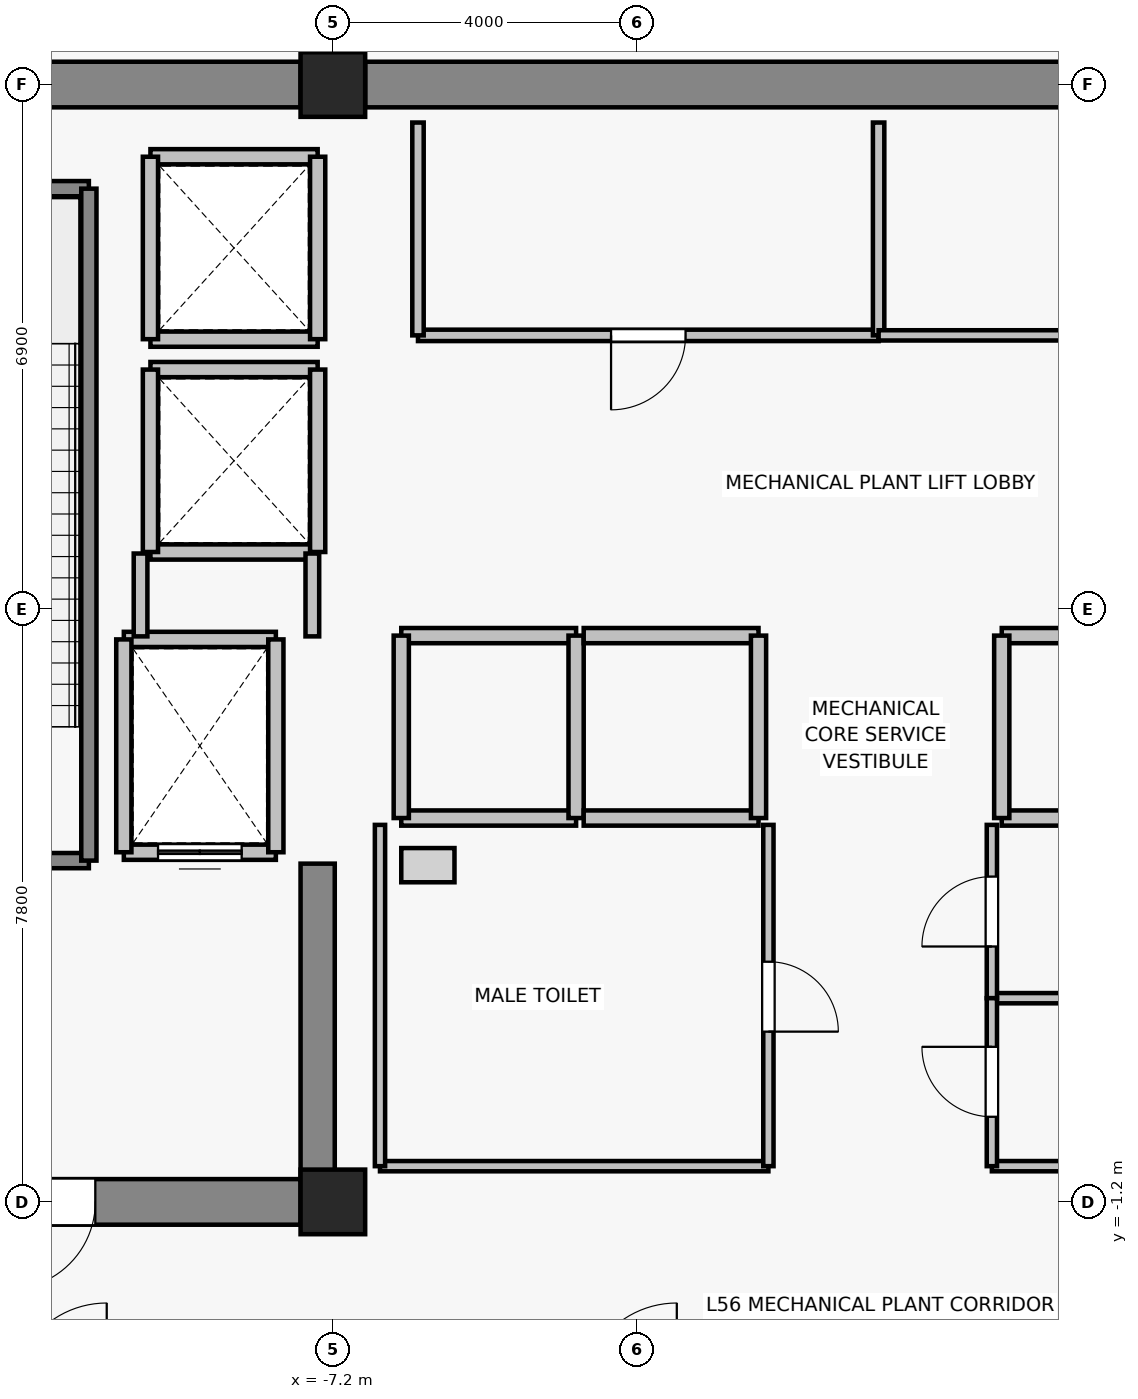
"""IFC4 building model, lengths in metres.
Left out: names, types, materials, properties, quantities, classifications, styles, units other than length and angle.
Written with IfcOpenShell. Run it as: python <this file> out.ifc"""

import sys

from ifc_helpers import new_model, si_unit, direction, frame, frame_2d, origin, origin_2d, place, context, subcontext, project, spatial, rectangle, extrude, source, transform, mapped, element, fill, save


model = new_model("IFC4")
c1 = context("Model", 3, precision=1e-05, world=origin(), true_north=direction((0.0, 1.0)))
c2 = subcontext(c1, "Body", "Model", "MODEL_VIEW")
j1 = project(units=[si_unit("LENGTHUNIT", "METRE"), si_unit("PLANEANGLEUNIT", "RADIAN")], contexts=[c1])
p1 = place(None, origin())
s1 = spatial("IfcSite", under=j1, at=p1, CompositionType="ELEMENT")
p2 = place(p1, origin())
s2 = spatial("IfcBuilding", under=s1, at=p2, CompositionType="ELEMENT")
p3 = place(p2, frame((0.0, 0.0, 199.0)))
s3 = spatial("IfcBuildingStorey", under=s2, at=p3, CompositionType="ELEMENT", Elevation=199.0)
for number, where, z_axis, x_axis in (
    (1, (-7.2, -1.2, 0.0), (0.0, 0.0, 1.0), (1.0, 0.0, 0.0)),
    (2, (-7.2, 13.5, 0.0), (0.0, 0.0, 1.0), (1.0, 0.0, 0.0)),
):
    element("IfcColumn", number, at=place(p3, frame(where, z_axis=z_axis, x_axis=x_axis)), inside=s3, PredefinedType="COLUMN", context=c2, shape_type="SweptSolid", body=[
        extrude(rectangle(XDim=0.85, YDim=0.85, at=origin_2d()), origin(), (0.0, 0.0, 1.0), 6.6),
    ])
p4 = place(p3, frame((-13.975, 13.5, 0.0), z_axis=(0.0, 0.0, 1.0), x_axis=(1.0, 0.0, 0.0)))
e3 = element("IfcWall", 3, at=p4, inside=s3, PredefinedType="SHEAR", context=c2, shape_type="SweptSolid", body=[
    extrude(rectangle(XDim=6.35, YDim=0.6, at=frame_2d((3.175, 0.0))), origin(), (0.0, 0.0, 1.0), 6.35),
])
p5 = place(p3, frame((-6.775, 13.5, 0.0), z_axis=(0.0, 0.0, 1.0), x_axis=(1.0, 0.0, 0.0)))
e4 = element("IfcWall", 4, at=p5, inside=s3, PredefinedType="SHEAR", context=c2, shape_type="SweptSolid", body=[
    extrude(rectangle(XDim=13.55, YDim=0.6, at=frame_2d((6.775, 0.0))), origin(), (0.0, 0.0, 1.0), 6.35),
])
p6 = place(p3, frame((-7.625, -1.2, 0.0), z_axis=(0.0, 0.0, 1.0), x_axis=(-1.0, 0.0, 0.0)))
e5 = element("IfcWall", 5, at=p6, inside=s3, PredefinedType="SHEAR", context=c2, shape_type="SweptSolid", body=[
    extrude(rectangle(XDim=6.35, YDim=0.6, at=frame_2d((3.175, 0.0))), origin(), (0.0, 0.0, 1.0), 6.35),
])
p7 = place(p6, frame((2.7, 0.0, 0.0)))
e6 = element("IfcOpeningElement", 6, at=p7, cuts=e5, PredefinedType="OPENING", context=c2, shape_type="SweptSolid", body=[
    extrude(rectangle(XDim=1.15, YDim=2.15, at=frame_2d((0.575, 1.075))), frame((0.0, 0.31, 0.0), z_axis=(0.0, -1.0, 0.0), x_axis=(1.0, 0.0, 0.0)), (0.0, 0.0, 1.0), 0.62),
])
p8 = place(p3, frame((-7.4, -0.9, 0.0), z_axis=(0.0, 0.0, 1.0), x_axis=(0.0, 1.0, 0.0)))
e7 = element("IfcWall", 7, at=p8, inside=s3, PredefinedType="SHEAR", context=c2, shape_type="SweptSolid", body=[
    extrude(rectangle(XDim=4.15, YDim=0.45, at=frame_2d((2.075, 0.0))), origin(), (0.0, 0.0, 1.0), 6.35),
])
p9 = place(p3, frame((-7.95, 3.4, 0.0), z_axis=(0.0, 0.0, 1.0), x_axis=(-1.0, 0.0, 0.0)))
e8 = element("IfcWall", 8, at=p9, inside=s3, PredefinedType="SOLIDWALL", context=c2, shape_type="SweptSolid", body=[
    extrude(rectangle(XDim=2.0, YDim=0.2, at=frame_2d((1.0, 0.0))), origin(), (0.0, 0.0, 1.0), 6.35),
])
p10 = place(p9, frame((0.45, 0.0, 0.0)))
e9 = element("IfcOpeningElement", 9, at=p10, cuts=e8, PredefinedType="OPENING", context=c2, shape_type="SweptSolid", body=[
    extrude(rectangle(XDim=1.1, YDim=2.2, at=frame_2d((0.55, 1.1))), frame((0.0, 0.11, 0.0), z_axis=(0.0, -1.0, 0.0), x_axis=(1.0, 0.0, 0.0)), (0.0, 0.0, 1.0), 0.22),
])
p11 = place(p3, frame((-9.95, 6.2, 0.0), z_axis=(0.0, 0.0, 1.0), x_axis=(1.0, 0.0, 0.0)))
e10 = element("IfcWall", 10, at=p11, inside=s3, PredefinedType="SOLIDWALL", context=c2, shape_type="SweptSolid", body=[
    extrude(rectangle(XDim=2.0, YDim=0.2, at=frame_2d((1.0, 0.0))), origin(), (0.0, 0.0, 1.0), 6.35),
])
for number, where, z_axis, x_axis in (
    (11, (-9.95, 3.4, 0.0), (0.0, 0.0, 1.0), (0.0, 1.0, 0.0)),
    (12, (-7.95, 6.2, 0.0), (0.0, 0.0, 1.0), (0.0, -1.0, 0.0)),
):
    element("IfcWall", number, at=place(p3, frame(where, z_axis=z_axis, x_axis=x_axis)), inside=s3, PredefinedType="SOLIDWALL", context=c2, shape_type="SweptSolid", body=[
        extrude(rectangle(XDim=2.8, YDim=0.2, at=frame_2d((1.4, 0.0))), origin(), (0.0, 0.0, 1.0), 6.35),
    ])
for number, where, z_axis, x_axis in (
    (13, (-4.0, 3.85, 0.0), (0.0, 0.0, 1.0), (-1.0, 0.0, 0.0)),
    (14, (-6.3, 6.25, 0.0), (0.0, 0.0, 1.0), (1.0, 0.0, 0.0)),
):
    element("IfcWall", number, at=place(p3, frame(where, z_axis=z_axis, x_axis=x_axis)), inside=s3, PredefinedType="SOLIDWALL", context=c2, shape_type="SweptSolid", body=[
        extrude(rectangle(XDim=2.3, YDim=0.2, at=frame_2d((1.15, 0.0))), origin(), (0.0, 0.0, 1.0), 6.35),
    ])
for number, where, z_axis, x_axis in (
    (15, (-6.3, 3.85, 0.0), (0.0, 0.0, 1.0), (0.0, 1.0, 0.0)),
    (16, (-4.0, 6.25, 0.0), (0.0, 0.0, 1.0), (0.0, -1.0, 0.0)),
):
    element("IfcWall", number, at=place(p3, frame(where, z_axis=z_axis, x_axis=x_axis)), inside=s3, PredefinedType="SOLIDWALL", context=c2, shape_type="SweptSolid", body=[
        extrude(rectangle(XDim=2.4, YDim=0.2, at=frame_2d((1.2, 0.0))), origin(), (0.0, 0.0, 1.0), 6.35),
    ])
for number, where, z_axis, x_axis in (
    (17, (-1.6, 3.85, 0.0), (0.0, 0.0, 1.0), (-1.0, 0.0, 0.0)),
    (18, (-3.9, 6.25, 0.0), (0.0, 0.0, 1.0), (1.0, 0.0, 0.0)),
):
    element("IfcWall", number, at=place(p3, frame(where, z_axis=z_axis, x_axis=x_axis)), inside=s3, PredefinedType="SOLIDWALL", context=c2, shape_type="SweptSolid", body=[
        extrude(rectangle(XDim=2.3, YDim=0.2, at=frame_2d((1.15, 0.0))), origin(), (0.0, 0.0, 1.0), 6.35),
    ])
p12 = place(p3, frame((-1.6, 6.25, 0.0), z_axis=(0.0, 0.0, 1.0), x_axis=(0.0, -1.0, 0.0)))
e19 = element("IfcWall", 19, at=p12, inside=s3, PredefinedType="SOLIDWALL", context=c2, shape_type="SweptSolid", body=[
    extrude(rectangle(XDim=2.4, YDim=0.2, at=frame_2d((1.2, 0.0))), origin(), (0.0, 0.0, 1.0), 6.35),
])
for number, where, z_axis, x_axis in (
    (20, (3.9, 3.85, 0.0), (0.0, 0.0, 1.0), (-1.0, 0.0, 0.0)),
    (21, (1.6, 6.25, 0.0), (0.0, 0.0, 1.0), (1.0, 0.0, 0.0)),
):
    element("IfcWall", number, at=place(p3, frame(where, z_axis=z_axis, x_axis=x_axis)), inside=s3, PredefinedType="SOLIDWALL", context=c2, shape_type="SweptSolid", body=[
        extrude(rectangle(XDim=2.3, YDim=0.2, at=frame_2d((1.15, 0.0))), origin(), (0.0, 0.0, 1.0), 6.35),
    ])
p13 = place(p3, frame((1.6, 3.85, 0.0), z_axis=(0.0, 0.0, 1.0), x_axis=(0.0, 1.0, 0.0)))
e22 = element("IfcWall", 22, at=p13, inside=s3, PredefinedType="SOLIDWALL", context=c2, shape_type="SweptSolid", body=[
    extrude(rectangle(XDim=2.4, YDim=0.2, at=frame_2d((1.2, 0.0))), origin(), (0.0, 0.0, 1.0), 6.35),
])
for number, where, z_axis, x_axis in (
    (23, (-7.4, 7.35, 0.0), (0.0, 0.0, 1.0), (-1.0, 0.0, 0.0)),
    (24, (-9.6, 9.75, 0.0), (0.0, 0.0, 1.0), (1.0, 0.0, 0.0)),
):
    element("IfcWall", number, at=place(p3, frame(where, z_axis=z_axis, x_axis=x_axis)), inside=s3, PredefinedType="SOLIDWALL", context=c2, shape_type="SweptSolid", body=[
        extrude(rectangle(XDim=2.2, YDim=0.2, at=frame_2d((1.1, 0.0))), origin(), (0.0, 0.0, 1.0), 5.89),
    ])
p14 = place(p3, frame((-9.6, 7.35, 0.0), z_axis=(0.0, 0.0, 1.0), x_axis=(0.0, 1.0, 0.0)))
e25 = element("IfcWall", 25, at=p14, inside=s3, PredefinedType="SOLIDWALL", context=c2, shape_type="SweptSolid", body=[
    extrude(rectangle(XDim=2.4, YDim=0.2, at=frame_2d((1.2, 0.0))), origin(), (0.0, 0.0, 1.0), 6.35),
])
p15 = place(p3, frame((-7.4, 9.75, 0.0), z_axis=(0.0, 0.0, 1.0), x_axis=(0.0, -1.0, 0.0)))
e26 = element("IfcWall", 26, at=p15, inside=s3, PredefinedType="SOLIDWALL", context=c2, shape_type="SweptSolid", body=[
    extrude(rectangle(XDim=2.4, YDim=0.2, at=frame_2d((1.2, 0.0))), origin(), (0.0, 0.0, 1.0), 5.89),
])
for number, where, z_axis, x_axis in (
    (27, (-7.4, 10.15, 0.0), (0.0, 0.0, 1.0), (-1.0, 0.0, 0.0)),
    (28, (-9.6, 12.55, 0.0), (0.0, 0.0, 1.0), (1.0, 0.0, 0.0)),
):
    element("IfcWall", number, at=place(p3, frame(where, z_axis=z_axis, x_axis=x_axis)), inside=s3, PredefinedType="SOLIDWALL", context=c2, shape_type="SweptSolid", body=[
        extrude(rectangle(XDim=2.2, YDim=0.2, at=frame_2d((1.1, 0.0))), origin(), (0.0, 0.0, 1.0), 5.89),
    ])
p16 = place(p3, frame((-9.6, 10.15, 0.0), z_axis=(0.0, 0.0, 1.0), x_axis=(0.0, 1.0, 0.0)))
e29 = element("IfcWall", 29, at=p16, inside=s3, PredefinedType="SOLIDWALL", context=c2, shape_type="SweptSolid", body=[
    extrude(rectangle(XDim=2.4, YDim=0.2, at=frame_2d((1.2, 0.0))), origin(), (0.0, 0.0, 1.0), 6.35),
])
p17 = place(p3, frame((-7.4, 12.55, 0.0), z_axis=(0.0, 0.0, 1.0), x_axis=(0.0, -1.0, 0.0)))
e30 = element("IfcWall", 30, at=p17, inside=s3, PredefinedType="SOLIDWALL", context=c2, shape_type="SweptSolid", body=[
    extrude(rectangle(XDim=2.4, YDim=0.2, at=frame_2d((1.2, 0.0))), origin(), (0.0, 0.0, 1.0), 5.89),
])
p18 = place(p3, frame((-10.41, 3.29, 0.0), z_axis=(0.0, 0.0, 1.0), x_axis=(-1.0, 0.0, 0.0)))
e31 = element("IfcWall", 31, at=p18, inside=s3, PredefinedType="SOLIDWALL", context=c2, shape_type="SweptSolid", body=[
    extrude(rectangle(XDim=3.52, YDim=0.2, at=frame_2d((1.76, 0.0))), origin(), (0.0, 0.0, 1.0), 6.35),
])
p19 = place(p18, frame((1.165, 0.0, 0.0)))
e32 = element("IfcOpeningElement", 32, at=p19, cuts=e31, PredefinedType="OPENING", context=c2, shape_type="SweptSolid", body=[
    extrude(rectangle(XDim=1.15, YDim=2.15, at=frame_2d((0.575, 1.075))), frame((0.0, 0.11, 0.0), z_axis=(0.0, -1.0, 0.0), x_axis=(1.0, 0.0, 0.0)), (0.0, 0.0, 1.0), 0.22),
])
p20 = place(p3, frame((-13.93, 12.13, 0.0), z_axis=(0.0, 0.0, 1.0), x_axis=(1.0, 0.0, 0.0)))
e33 = element("IfcWall", 33, at=p20, inside=s3, PredefinedType="SOLIDWALL", context=c2, shape_type="SweptSolid", body=[
    extrude(rectangle(XDim=3.52, YDim=0.2, at=frame_2d((1.76, 0.0))), origin(), (0.0, 0.0, 1.0), 6.35),
])
p21 = place(p3, frame((-10.41, 12.13, 0.0), z_axis=(0.0, 0.0, 1.0), x_axis=(0.0, -1.0, 0.0)))
e34 = element("IfcWall", 34, at=p21, inside=s3, PredefinedType="SOLIDWALL", context=c2, shape_type="SweptSolid", body=[
    extrude(rectangle(XDim=8.84, YDim=0.2, at=frame_2d((4.42, 0.0))), origin(), (0.0, 0.0, 1.0), 6.35),
])
p22 = place(p3, frame((-9.73, 6.24, 0.0), z_axis=(0.0, 0.0, 1.0), x_axis=(0.0, 1.0, 0.0)))
e35 = element("IfcWall", 35, at=p22, inside=s3, PredefinedType="PARTITIONING", context=c2, shape_type="SweptSolid", body=[
    extrude(rectangle(XDim=1.09, YDim=0.18, at=frame_2d((0.545, 0.0))), origin(), (0.0, 0.0, 1.0), 6.35),
])
p23 = place(p3, frame((-7.47, 7.33, 0.0), z_axis=(0.0, 0.0, 1.0), x_axis=(0.0, -1.0, 0.0)))
e36 = element("IfcWall", 36, at=p23, inside=s3, PredefinedType="PARTITIONING", context=c2, shape_type="SweptSolid", body=[
    extrude(rectangle(XDim=1.09, YDim=0.18, at=frame_2d((0.545, 0.0))), origin(), (0.0, 0.0, 1.0), 5.89),
])
p24 = place(p3, frame((-0.02, 10.2, 0.0), z_axis=(0.0, 0.0, 1.0), x_axis=(-1.0, 0.0, 0.0)))
e37 = element("IfcWall", 37, at=p24, inside=s3, PredefinedType="PARTITIONING", context=c2, shape_type="SweptSolid", body=[
    extrude(rectangle(XDim=6.06, YDim=0.15, at=frame_2d((3.03, 0.0))), origin(), (0.0, 0.0, 1.0), 5.89),
])
p25 = place(p24, frame((2.54, 0.0, 0.0)))
e38 = element("IfcOpeningElement", 38, at=p25, cuts=e37, PredefinedType="OPENING", context=c2, shape_type="SweptSolid", body=[
    extrude(rectangle(XDim=0.98, YDim=2.15, at=frame_2d((0.49, 1.075))), frame((0.0, 0.085, 0.0), z_axis=(0.0, -1.0, 0.0), x_axis=(1.0, 0.0, 0.0)), (0.0, 0.0, 1.0), 0.17),
])
p26 = place(p3, frame((-6.08, 10.2, 0.0), z_axis=(0.0, 0.0, 1.0), x_axis=(0.0, 1.0, 0.0)))
e39 = element("IfcWall", 39, at=p26, inside=s3, PredefinedType="PARTITIONING", context=c2, shape_type="SweptSolid", body=[
    extrude(rectangle(XDim=2.8, YDim=0.15, at=frame_2d((1.4, 0.0))), origin(), (0.0, 0.0, 1.0), 6.35),
])
p27 = place(p3, frame((-0.02, 13.0, 0.0), z_axis=(0.0, 0.0, 1.0), x_axis=(0.0, -1.0, 0.0)))
e40 = element("IfcWall", 40, at=p27, inside=s3, PredefinedType="PARTITIONING", context=c2, shape_type="SweptSolid", body=[
    extrude(rectangle(XDim=2.8, YDim=0.15, at=frame_2d((1.4, 0.0))), origin(), (0.0, 0.0, 1.0), 5.89),
])
p28 = place(p3, frame((6.08, 10.2, 0.0), z_axis=(0.0, 0.0, 1.0), x_axis=(-1.0, 0.0, 0.0)))
e41 = element("IfcWall", 41, at=p28, inside=s3, PredefinedType="PARTITIONING", context=c2, shape_type="SweptSolid", body=[
    extrude(rectangle(XDim=6.1, YDim=0.135, at=frame_2d((3.05, 0.0))), origin(), (0.0, 0.0, 1.0), 5.89),
])
p29 = place(p28, frame((2.56, 0.0, 0.0)))
e42 = element("IfcOpeningElement", 42, at=p29, cuts=e41, PredefinedType="OPENING", context=c2, shape_type="SweptSolid", body=[
    extrude(rectangle(XDim=0.98, YDim=2.15, at=frame_2d((0.49, 1.075))), frame((0.0, 0.077, 0.0), z_axis=(0.0, -1.0, 0.0), x_axis=(1.0, 0.0, 0.0)), (0.0, 0.0, 1.0), 0.155),
])
p30 = place(p3, frame((-1.47, -0.73, 0.0), z_axis=(0.0, 0.0, 1.0), x_axis=(-1.0, 0.0, 0.0)))
e43 = element("IfcWall", 43, at=p30, inside=s3, PredefinedType="PARTITIONING", context=c2, shape_type="SweptSolid", body=[
    extrude(rectangle(XDim=5.11, YDim=0.135, at=frame_2d((2.555, 0.0))), origin(), (0.0, 0.0, 1.0), 6.35),
])
p31 = place(p3, frame((-6.58, -0.73, 0.0), z_axis=(0.0, 0.0, 1.0), x_axis=(0.0, 1.0, 0.0)))
e44 = element("IfcWall", 44, at=p31, inside=s3, PredefinedType="PARTITIONING", context=c2, shape_type="SweptSolid", body=[
    extrude(rectangle(XDim=4.49, YDim=0.135, at=frame_2d((2.245, 0.0))), origin(), (0.0, 0.0, 1.0), 6.35),
])
p32 = place(p3, frame((-1.47, 3.76, 0.0), z_axis=(0.0, 0.0, 1.0), x_axis=(0.0, -1.0, 0.0)))
e45 = element("IfcWall", 45, at=p32, inside=s3, PredefinedType="PARTITIONING", context=c2, shape_type="SweptSolid", body=[
    extrude(rectangle(XDim=4.49, YDim=0.135, at=frame_2d((2.245, 0.0))), origin(), (0.0, 0.0, 1.0), 6.35),
])
p33 = place(p32, frame((1.8, 0.0, 0.0)))
e46 = element("IfcOpeningElement", 46, at=p33, cuts=e45, PredefinedType="OPENING", context=c2, shape_type="SweptSolid", body=[
    extrude(rectangle(XDim=0.92, YDim=2.1, at=frame_2d((0.46, 1.05))), frame((0.0, 0.077, 0.0), z_axis=(0.0, -1.0, 0.0), x_axis=(1.0, 0.0, 0.0)), (0.0, 0.0, 1.0), 0.155),
])
p34 = place(p3, frame((6.58, 1.48, 0.0), z_axis=(0.0, 0.0, 1.0), x_axis=(-1.0, 0.0, 0.0)))
e47 = element("IfcWall", 47, at=p34, inside=s3, PredefinedType="PARTITIONING", context=c2, shape_type="SweptSolid", body=[
    extrude(rectangle(XDim=5.11, YDim=0.135, at=frame_2d((2.555, 0.0))), origin(), (0.0, 0.0, 1.0), 6.35),
])
p35 = place(p3, frame((1.47, 1.48, 0.0), z_axis=(0.0, 0.0, 1.0), x_axis=(0.0, 1.0, 0.0)))
e48 = element("IfcWall", 48, at=p35, inside=s3, PredefinedType="PARTITIONING", context=c2, shape_type="SweptSolid", body=[
    extrude(rectangle(XDim=2.28, YDim=0.135, at=frame_2d((1.14, 0.0))), origin(), (0.0, 0.0, 1.0), 6.35),
])
p36 = place(p35, frame((0.68, 0.0, 0.0)))
e49 = element("IfcOpeningElement", 49, at=p36, cuts=e48, PredefinedType="OPENING", context=c2, shape_type="SweptSolid", body=[
    extrude(rectangle(XDim=0.92, YDim=2.1, at=frame_2d((0.46, 1.05))), frame((0.0, 0.077, 0.0), z_axis=(0.0, -1.0, 0.0), x_axis=(1.0, 0.0, 0.0)), (0.0, 0.0, 1.0), 0.155),
])
p37 = place(p3, frame((4.18, -0.73, 0.0), z_axis=(0.0, 0.0, 1.0), x_axis=(-1.0, 0.0, 0.0)))
e50 = element("IfcWall", 50, at=p37, inside=s3, PredefinedType="PARTITIONING", context=c2, shape_type="SweptSolid", body=[
    extrude(rectangle(XDim=2.71, YDim=0.135, at=frame_2d((1.355, 0.0))), origin(), (0.0, 0.0, 1.0), 6.35),
])
p38 = place(p3, frame((1.47, -0.73, 0.0), z_axis=(0.0, 0.0, 1.0), x_axis=(0.0, 1.0, 0.0)))
e51 = element("IfcWall", 51, at=p38, inside=s3, PredefinedType="PARTITIONING", context=c2, shape_type="SweptSolid", body=[
    extrude(rectangle(XDim=2.21, YDim=0.135, at=frame_2d((1.105, 0.0))), origin(), (0.0, 0.0, 1.0), 6.35),
])
p39 = place(p38, frame((0.65, 0.0, 0.0)))
e52 = element("IfcOpeningElement", 52, at=p39, cuts=e51, PredefinedType="OPENING", context=c2, shape_type="SweptSolid", body=[
    extrude(rectangle(XDim=0.92, YDim=2.1, at=frame_2d((0.46, 1.05))), frame((0.0, 0.077, 0.0), z_axis=(0.0, -1.0, 0.0), x_axis=(1.0, 0.0, 0.0)), (0.0, 0.0, 1.0), 0.155),
])
m1 = source(origin(), c2, "Body", "SweptSolid", [
    extrude(rectangle(XDim=1.1, YDim=2.2, at=frame_2d((0.55, 1.1))), frame((0.0, 0.025, 0.0), z_axis=(0.0, -1.0, 0.0), x_axis=(1.0, 0.0, 0.0)), (0.0, 0.0, 1.0), 0.05),
])
p40 = place(p10, origin())
e53 = element("IfcDoor", 53, at=p40, inside=s3, OperationType="DOUBLE_DOOR_SLIDING", PredefinedType="DOOR", context=c2, shape_type="MappedRepresentation", body=[
    mapped(m1, transform((0.0, 0.0, 0.0), x_axis=(1.0, 0.0, 0.0), y_axis=(0.0, 1.0, 0.0), z_axis=(0.0, 0.0, 1.0), scale=1.0)),
])
fill(e9, e53)
m2 = source(origin(), c2, "Body", "SweptSolid", [
    extrude(rectangle(XDim=1.15, YDim=2.15, at=frame_2d((0.575, 1.075))), frame((0.0, 0.025, 0.0), z_axis=(0.0, -1.0, 0.0), x_axis=(1.0, 0.0, 0.0)), (0.0, 0.0, 1.0), 0.05),
])
p41 = place(p7, origin())
e54 = element("IfcDoor", 54, at=p41, inside=s3, OperationType="SINGLE_SWING_RIGHT", PredefinedType="DOOR", context=c2, shape_type="MappedRepresentation", body=[
    mapped(m2, transform((0.0, 0.0, 0.0), x_axis=(1.0, 0.0, 0.0), y_axis=(0.0, 1.0, 0.0), z_axis=(0.0, 0.0, 1.0), scale=1.0)),
])
fill(e6, e54)
m3 = source(origin(), c2, "Body", "SweptSolid", [
    extrude(rectangle(XDim=0.98, YDim=2.15, at=frame_2d((0.49, 1.075))), frame((0.0, 0.025, 0.0), z_axis=(0.0, -1.0, 0.0), x_axis=(1.0, 0.0, 0.0)), (0.0, 0.0, 1.0), 0.05),
])
p42 = place(p25, origin())
e55 = element("IfcDoor", 55, at=p42, inside=s3, OperationType="SINGLE_SWING_RIGHT", PredefinedType="DOOR", context=c2, shape_type="MappedRepresentation", body=[
    mapped(m3, transform((0.0, 0.0, 0.0), x_axis=(1.0, 0.0, 0.0), y_axis=(0.0, 1.0, 0.0), z_axis=(0.0, 0.0, 1.0), scale=1.0)),
])
fill(e38, e55)
m4 = source(origin(), c2, "Body", "SweptSolid", [
    extrude(rectangle(XDim=0.92, YDim=2.1, at=frame_2d((0.46, 1.05))), frame((0.0, 0.025, 0.0), z_axis=(0.0, -1.0, 0.0), x_axis=(1.0, 0.0, 0.0)), (0.0, 0.0, 1.0), 0.05),
])
p43 = place(p33, origin())
e56 = element("IfcDoor", 56, at=p43, inside=s3, OperationType="SINGLE_SWING_RIGHT", PredefinedType="DOOR", context=c2, shape_type="MappedRepresentation", body=[
    mapped(m4, transform((0.0, 0.0, 0.0), x_axis=(1.0, 0.0, 0.0), y_axis=(0.0, 1.0, 0.0), z_axis=(0.0, 0.0, 1.0), scale=1.0)),
])
fill(e46, e56)
p44 = place(p36, origin())
e57 = element("IfcDoor", 57, at=p44, inside=s3, OperationType="SINGLE_SWING_LEFT", PredefinedType="DOOR", context=c2, shape_type="MappedRepresentation", body=[
    mapped(m4, transform((0.0, 0.0, 0.0), x_axis=(1.0, 0.0, 0.0), y_axis=(0.0, 1.0, 0.0), z_axis=(0.0, 0.0, 1.0), scale=1.0)),
])
fill(e49, e57)
p45 = place(p39, origin())
e58 = element("IfcDoor", 58, at=p45, inside=s3, OperationType="SINGLE_SWING_RIGHT", PredefinedType="DOOR", context=c2, shape_type="MappedRepresentation", body=[
    mapped(m4, transform((0.0, 0.0, 0.0), x_axis=(1.0, 0.0, 0.0), y_axis=(0.0, 1.0, 0.0), z_axis=(0.0, 0.0, 1.0), scale=1.0)),
])
fill(e52, e58)
save(model, sys.argv[1])
